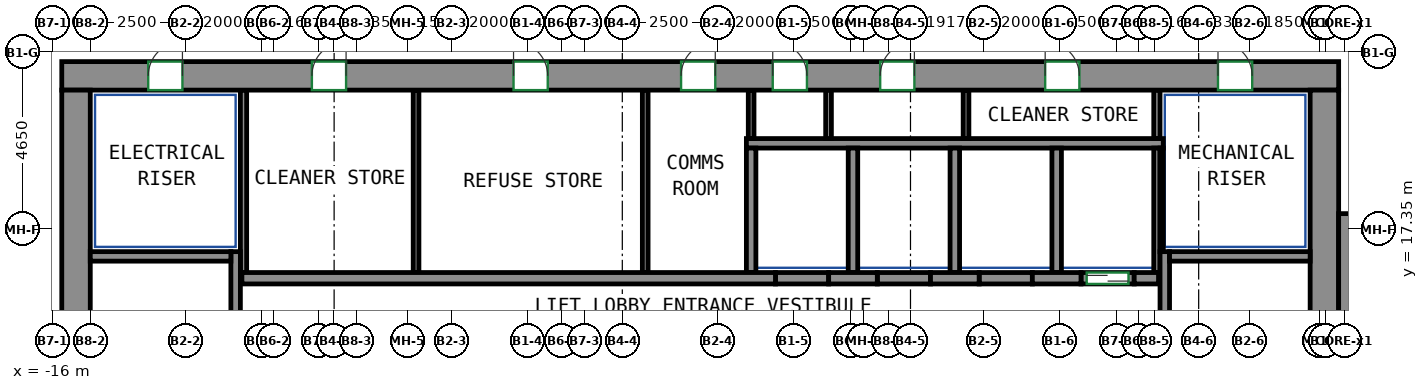
"""IFC4 building model, lengths in metres.
Left out: names, types, materials, properties, quantities, classifications, styles, units other than length and angle.
Written with IfcOpenShell. Run it as: python <this file> out.ifc"""

import sys

from ifc_helpers import new_model, si_unit, direction, frame, frame_2d, origin, place, context, subcontext, project, spatial, rectangle, extrude, source, transform, mapped, element, fill, save


model = new_model("IFC4")
c1 = context("Model", 3, precision=1e-05, world=origin(), true_north=direction((0.0, 1.0)))
c2 = subcontext(c1, "Body", "Model", "MODEL_VIEW")
j1 = project(units=[si_unit("LENGTHUNIT", "METRE"), si_unit("PLANEANGLEUNIT", "RADIAN")], contexts=[c1])
p1 = place(None, origin())
s1 = spatial("IfcSite", under=j1, at=p1, CompositionType="ELEMENT")
p2 = place(p1, origin())
s2 = spatial("IfcBuilding", under=s1, at=p2, CompositionType="ELEMENT")
p3 = place(p2, frame((0.0, 0.0, 182.1)))
s3 = spatial("IfcBuildingStorey", under=s2, at=p3, CompositionType="ELEMENT", Elevation=182.1)
m1 = source(origin(), c2, "Body", "SweptSolid", [
    extrude(rectangle(XDim=33.6, YDim=0.75, at=frame_2d((16.8, 0.0))), origin(), (0.0, 0.0, 1.0), 3.12),
])
p4 = place(p3, frame((-15.75, 21.375, 0.0), z_axis=(0.0, 0.0, 1.0), x_axis=(1.0, 0.0, 0.0)))
e1 = element("IfcWall", 1, at=p4, inside=s3, PredefinedType="SHEAR", context=c2, shape_type="MappedRepresentation", body=[
    mapped(m1, transform((0.0, 0.0, 0.0))),
])
p5 = place(p4, frame((6.581, 0.0, 0.0)))
e2 = element("IfcOpeningElement", 2, at=p5, cuts=e1, PredefinedType="OPENING", context=c2, shape_type="SweptSolid", body=[
    extrude(rectangle(XDim=0.9, YDim=2.1, at=frame_2d((0.45, 1.05))), frame((0.0, 0.385, 0.0), z_axis=(0.0, -1.0, 0.0), x_axis=(1.0, 0.0, 0.0)), (0.0, 0.0, 1.0), 0.77),
])
p6 = place(p4, frame((11.888, 0.0, 0.0)))
e3 = element("IfcOpeningElement", 3, at=p6, cuts=e1, PredefinedType="OPENING", context=c2, shape_type="SweptSolid", body=[
    extrude(rectangle(XDim=0.9, YDim=2.1, at=frame_2d((0.45, 1.05))), frame((0.0, 0.385, 0.0), z_axis=(0.0, -1.0, 0.0), x_axis=(1.0, 0.0, 0.0)), (0.0, 0.0, 1.0), 0.77),
])
p7 = place(p4, frame((16.296, 0.0, 0.0)))
e4 = element("IfcOpeningElement", 4, at=p7, cuts=e1, PredefinedType="OPENING", context=c2, shape_type="SweptSolid", body=[
    extrude(rectangle(XDim=0.9, YDim=2.1, at=frame_2d((0.45, 1.05))), frame((0.0, 0.385, 0.0), z_axis=(0.0, -1.0, 0.0), x_axis=(1.0, 0.0, 0.0)), (0.0, 0.0, 1.0), 0.77),
])
p8 = place(p4, frame((18.708, 0.0, 0.0)))
e5 = element("IfcOpeningElement", 5, at=p8, cuts=e1, PredefinedType="OPENING", context=c2, shape_type="SweptSolid", body=[
    extrude(rectangle(XDim=0.9, YDim=2.1, at=frame_2d((0.45, 1.05))), frame((0.0, 0.385, 0.0), z_axis=(0.0, -1.0, 0.0), x_axis=(1.0, 0.0, 0.0)), (0.0, 0.0, 1.0), 0.77),
])
p9 = place(p4, frame((21.536, 0.0, 0.0)))
e6 = element("IfcOpeningElement", 6, at=p9, cuts=e1, PredefinedType="OPENING", context=c2, shape_type="SweptSolid", body=[
    extrude(rectangle(XDim=0.9, YDim=2.1, at=frame_2d((0.45, 1.05))), frame((0.0, 0.385, 0.0), z_axis=(0.0, -1.0, 0.0), x_axis=(1.0, 0.0, 0.0)), (0.0, 0.0, 1.0), 0.77),
])
p10 = place(p4, frame((25.877, 0.0, 0.0)))
e7 = element("IfcOpeningElement", 7, at=p10, cuts=e1, PredefinedType="OPENING", context=c2, shape_type="SweptSolid", body=[
    extrude(rectangle(XDim=0.9, YDim=2.1, at=frame_2d((0.45, 1.05))), frame((0.0, 0.385, 0.0), z_axis=(0.0, -1.0, 0.0), x_axis=(1.0, 0.0, 0.0)), (0.0, 0.0, 1.0), 0.77),
])
p11 = place(p4, frame((2.275, 0.0, 0.0)))
e8 = element("IfcOpeningElement", 8, at=p11, cuts=e1, PredefinedType="OPENING", context=c2, shape_type="SweptSolid", body=[
    extrude(rectangle(XDim=0.9, YDim=2.1, at=frame_2d((0.45, 1.05))), frame((0.0, 0.385, 0.0), z_axis=(0.0, -1.0, 0.0), x_axis=(1.0, 0.0, 0.0)), (0.0, 0.0, 1.0), 0.77),
])
p12 = place(p4, frame((30.425, 0.0, 0.0)))
e9 = element("IfcOpeningElement", 9, at=p12, cuts=e1, PredefinedType="OPENING", context=c2, shape_type="SweptSolid", body=[
    extrude(rectangle(XDim=0.9, YDim=2.1, at=frame_2d((0.45, 1.05))), frame((0.0, 0.385, 0.0), z_axis=(0.0, -1.0, 0.0), x_axis=(1.0, 0.0, 0.0)), (0.0, 0.0, 1.0), 0.77),
])
m2 = source(origin(), c2, "Body", "SweptSolid", [
    extrude(rectangle(XDim=12.0, YDim=0.75, at=frame_2d((6.0, 0.0))), origin(), (0.0, 0.0, 1.0), 3.12),
])
for number, where, z_axis, x_axis in (
    (10, (-15.375, 9.0, 0.0), (0.0, 0.0, 1.0), (0.0, 1.0, 0.0)),
    (11, (17.475, 9.0, 0.0), (0.0, 0.0, 1.0), (0.0, 1.0, 0.0)),
):
    element("IfcWall", number, at=place(p3, frame(where, z_axis=z_axis, x_axis=x_axis)), inside=s3, PredefinedType="SHEAR", context=c2, shape_type="MappedRepresentation", body=[
        mapped(m2, transform((0.0, 0.0, 0.0))),
    ])
m3 = source(origin(), c2, "Body", "SweptSolid", [
    extrude(rectangle(XDim=7.75, YDim=0.25, at=frame_2d((3.875, 0.0))), origin(), (0.0, 0.0, 1.0), 3.12),
])
p13 = place(p3, frame((-11.175, 9.0, 0.0), z_axis=(0.0, 0.0, 1.0), x_axis=(0.0, 1.0, 0.0)))
e12 = element("IfcWall", 12, at=p13, inside=s3, PredefinedType="SHEAR", context=c2, shape_type="MappedRepresentation", body=[
    mapped(m3, transform((0.0, 0.0, 0.0))),
])
m4 = source(origin(), c2, "Body", "SweptSolid", [
    extrude(rectangle(XDim=3.7, YDim=0.25, at=frame_2d((1.85, 0.0))), origin(), (0.0, 0.0, 1.0), 3.12),
])
p14 = place(p3, frame((-15.0, 16.625, 0.0), z_axis=(0.0, 0.0, 1.0), x_axis=(1.0, 0.0, 0.0)))
e13 = element("IfcWall", 13, at=p14, inside=s3, PredefinedType="SHEAR", context=c2, shape_type="MappedRepresentation", body=[
    mapped(m4, transform((0.0, 0.0, 0.0))),
])
p15 = place(p3, frame((13.275, 9.0, 0.0), z_axis=(0.0, 0.0, 1.0), x_axis=(0.0, 1.0, 0.0)))
e14 = element("IfcWall", 14, at=p15, inside=s3, PredefinedType="SHEAR", context=c2, shape_type="MappedRepresentation", body=[
    mapped(m3, transform((0.0, 0.0, 0.0))),
])
m5 = source(origin(), c2, "Body", "SweptSolid", [
    extrude(rectangle(XDim=3.7, YDim=0.25, at=frame_2d((1.85, 0.0))), origin(), (0.0, 0.0, 1.0), 3.12),
])
p16 = place(p3, frame((13.4, 16.625, 0.0), z_axis=(0.0, 0.0, 1.0), x_axis=(1.0, 0.0, 0.0)))
e15 = element("IfcWall", 15, at=p16, inside=s3, PredefinedType="SHEAR", context=c2, shape_type="MappedRepresentation", body=[
    mapped(m5, transform((0.0, 0.0, 0.0))),
])
m6 = source(origin(), c2, "Body", "SweptSolid", [
    extrude(rectangle(XDim=8.0, YDim=0.5, at=frame_2d((4.0, 0.0))), origin(), (0.0, 0.0, 1.0), 3.12),
])
p17 = place(p3, frame((18.1, 9.75, 0.0), z_axis=(0.0, 0.0, 1.0), x_axis=(0.0, 1.0, 0.0)))
e16 = element("IfcWall", 16, at=p17, inside=s3, PredefinedType="SHEAR", context=c2, shape_type="MappedRepresentation", body=[
    mapped(m6, transform((0.0, 0.0, 0.0))),
])
m7 = source(origin(), c2, "Body", "SweptSolid", [
    extrude(rectangle(XDim=14.04, YDim=0.3, at=frame_2d((7.02, 0.0))), origin(), (0.0, 0.0, 1.0), 3.12),
])
p18 = place(p3, frame((-11.01, 16.05, 0.0), z_axis=(0.0, 0.0, 1.0), x_axis=(1.0, 0.0, 0.0)))
e17 = element("IfcWall", 17, at=p18, inside=s3, PredefinedType="SHEAR", context=c2, shape_type="MappedRepresentation", body=[
    mapped(m7, transform((0.0, 0.0, 0.0))),
])
m8 = source(origin(), c2, "Body", "SweptSolid", [
    extrude(rectangle(XDim=1.28, YDim=0.3, at=frame_2d((0.64, 0.0))), origin(), (0.0, 0.0, 1.0), 3.12),
])
p19 = place(p3, frame((4.43, 16.05, 0.0), z_axis=(0.0, 0.0, 1.0), x_axis=(1.0, 0.0, 0.0)))
e18 = element("IfcWall", 18, at=p19, inside=s3, PredefinedType="SHEAR", context=c2, shape_type="MappedRepresentation", body=[
    mapped(m8, transform((0.0, 0.0, 0.0))),
])
m9 = source(origin(), c2, "Body", "SweptSolid", [
    extrude(rectangle(XDim=1.28, YDim=0.3, at=frame_2d((0.64, 0.0))), origin(), (0.0, 0.0, 1.0), 3.12),
])
p20 = place(p3, frame((7.11, 16.05, 0.0), z_axis=(0.0, 0.0, 1.0), x_axis=(1.0, 0.0, 0.0)))
e19 = element("IfcWall", 19, at=p20, inside=s3, PredefinedType="SHEAR", context=c2, shape_type="MappedRepresentation", body=[
    mapped(m9, transform((0.0, 0.0, 0.0))),
])
p21 = place(p3, frame((9.79, 16.05, 0.0), z_axis=(0.0, 0.0, 1.0), x_axis=(1.0, 0.0, 0.0)))
e20 = element("IfcWall", 20, at=p21, inside=s3, PredefinedType="SHEAR", context=c2, shape_type="MappedRepresentation", body=[
    mapped(m8, transform((0.0, 0.0, 0.0))),
])
m10 = source(origin(), c2, "Body", "SweptSolid", [
    extrude(rectangle(XDim=0.64, YDim=0.3, at=frame_2d((0.32, 0.0))), origin(), (0.0, 0.0, 1.0), 3.12),
])
p22 = place(p3, frame((12.47, 16.05, 0.0), z_axis=(0.0, 0.0, 1.0), x_axis=(1.0, 0.0, 0.0)))
e21 = element("IfcWall", 21, at=p22, inside=s3, PredefinedType="SHEAR", context=c2, shape_type="MappedRepresentation", body=[
    mapped(m10, transform((0.0, 0.0, 0.0))),
])
m11 = source(origin(), c2, "Body", "SweptSolid", [
    extrude(rectangle(XDim=1.4, YDim=0.3, at=frame_2d((0.7, 0.0))), origin(), (0.0, 0.0, 1.0), 3.12),
])
p23 = place(p3, frame((11.07, 16.05, 0.0), z_axis=(0.0, 0.0, 1.0), x_axis=(1.0, 0.0, 0.0)))
e22 = element("IfcWall", 22, at=p23, inside=s3, PredefinedType="PARTITIONING", context=c2, shape_type="MappedRepresentation", body=[
    mapped(m11, transform((0.0, 0.0, 0.0))),
])
p24 = place(p23, frame((0.15, 0.0, 0.0)))
e23 = element("IfcOpeningElement", 23, at=p24, cuts=e22, PredefinedType="OPENING", context=c2, shape_type="SweptSolid", body=[
    extrude(rectangle(XDim=1.1, YDim=2.1, at=frame_2d((0.55, 1.05))), frame((0.0, 0.16, 0.0), z_axis=(0.0, -1.0, 0.0), x_axis=(1.0, 0.0, 0.0)), (0.0, 0.0, 1.0), 0.32),
])
p25 = place(p3, frame((3.03, 16.05, 0.0), z_axis=(0.0, 0.0, 1.0), x_axis=(1.0, 0.0, 0.0)))
e24 = element("IfcWall", 24, at=p25, inside=s3, PredefinedType="PARTITIONING", context=c2, shape_type="MappedRepresentation", body=[
    mapped(m11, transform((0.0, 0.0, 0.0))),
])
m12 = source(origin(), c2, "Body", "SweptSolid", [
    extrude(rectangle(XDim=1.4, YDim=0.3, at=frame_2d((0.7, 0.0))), origin(), (0.0, 0.0, 1.0), 3.12),
])
for number, where, z_axis, x_axis in (
    (25, (5.71, 16.05, 0.0), (0.0, 0.0, 1.0), (1.0, 0.0, 0.0)),
    (26, (8.39, 16.05, 0.0), (0.0, 0.0, 1.0), (1.0, 0.0, 0.0)),
):
    element("IfcWall", number, at=place(p3, frame(where, z_axis=z_axis, x_axis=x_axis)), inside=s3, PredefinedType="PARTITIONING", context=c2, shape_type="MappedRepresentation", body=[
        mapped(m12, transform((0.0, 0.0, 0.0))),
    ])
m13 = source(origin(), c2, "Body", "SweptSolid", [
    extrude(rectangle(XDim=10.97, YDim=0.25, at=frame_2d((5.485, 0.0))), origin(), (0.0, 0.0, 1.0), 3.12),
])
p26 = place(p3, frame((2.265, 19.6, 0.0), z_axis=(0.0, 0.0, 1.0), x_axis=(1.0, 0.0, 0.0)))
e27 = element("IfcWall", 27, at=p26, inside=s3, PredefinedType="PARTITIONING", context=c2, shape_type="MappedRepresentation", body=[
    mapped(m13, transform((0.0, 0.0, 0.0))),
])
m14 = source(origin(), c2, "Body", "SweptSolid", [
    extrude(rectangle(XDim=3.275, YDim=0.165, at=frame_2d((1.638, 0.0))), origin(), (0.0, 0.0, 1.0), 3.12),
])
p27 = place(p3, frame((13.067, 16.2, 0.0), z_axis=(0.0, 0.0, 1.0), x_axis=(0.0, 1.0, 0.0)))
e28 = element("IfcWall", 28, at=p27, inside=s3, PredefinedType="PARTITIONING", context=c2, shape_type="MappedRepresentation", body=[
    mapped(m14, transform((0.0, 0.0, 0.0))),
])
m15 = source(origin(), c2, "Body", "SweptSolid", [
    extrude(rectangle(XDim=1.275, YDim=0.165, at=frame_2d((0.637, 0.0))), origin(), (0.0, 0.0, 1.0), 3.12),
])
p28 = place(p3, frame((13.067, 19.725, 0.0), z_axis=(0.0, 0.0, 1.0), x_axis=(0.0, 1.0, 0.0)))
e29 = element("IfcWall", 29, at=p28, inside=s3, PredefinedType="PARTITIONING", context=c2, shape_type="MappedRepresentation", body=[
    mapped(m15, transform((0.0, 0.0, 0.0))),
])
m16 = source(origin(), c2, "Body", "SweptSolid", [
    extrude(rectangle(XDim=4.8, YDim=0.165, at=frame_2d((2.4, 0.0))), origin(), (0.0, 0.0, 1.0), 3.12),
])
p29 = place(p3, frame((-10.968, 16.2, 0.0), z_axis=(0.0, 0.0, 1.0), x_axis=(0.0, 1.0, 0.0)))
e30 = element("IfcWall", 30, at=p29, inside=s3, PredefinedType="PARTITIONING", context=c2, shape_type="MappedRepresentation", body=[
    mapped(m16, transform((0.0, 0.0, 0.0))),
])
m17 = source(origin(), c2, "Body", "SweptSolid", [
    extrude(rectangle(XDim=3.275, YDim=0.25, at=frame_2d((1.638, 0.0))), origin(), (0.0, 0.0, 1.0), 3.12),
])
p30 = place(p3, frame((10.43, 16.2, 0.0), z_axis=(0.0, 0.0, 1.0), x_axis=(0.0, 1.0, 0.0)))
e31 = element("IfcWall", 31, at=p30, inside=s3, PredefinedType="PARTITIONING", context=c2, shape_type="MappedRepresentation", body=[
    mapped(m17, transform((0.0, 0.0, 0.0))),
])
m18 = source(origin(), c2, "Body", "SweptSolid", [
    extrude(rectangle(XDim=2.725, YDim=0.085, at=frame_2d((1.363, 0.0))), origin(), (0.0, 0.0, 1.0), 3.12),
])
p31 = place(p3, frame((13.192, 16.75, 0.0), z_axis=(0.0, 0.0, 1.0), x_axis=(0.0, 1.0, 0.0)))
e32 = element("IfcWall", 32, at=p31, inside=s3, PredefinedType="PARTITIONING", context=c2, shape_type="MappedRepresentation", body=[
    mapped(m18, transform((0.0, 0.0, 0.0))),
])
for number, where, z_axis, x_axis in (
    (33, (2.39, 16.2, 0.0), (0.0, 0.0, 1.0), (0.0, 1.0, 0.0)),
    (34, (5.07, 16.2, 0.0), (0.0, 0.0, 1.0), (0.0, 1.0, 0.0)),
    (35, (7.75, 16.2, 0.0), (0.0, 0.0, 1.0), (0.0, 1.0, 0.0)),
):
    element("IfcWall", number, at=place(p3, frame(where, z_axis=z_axis, x_axis=x_axis)), inside=s3, PredefinedType="PARTITIONING", context=c2, shape_type="MappedRepresentation", body=[
        mapped(m17, transform((0.0, 0.0, 0.0))),
    ])
m19 = source(origin(), c2, "Body", "SweptSolid", [
    extrude(rectangle(XDim=4.8, YDim=0.15, at=frame_2d((2.4, 0.0))), origin(), (0.0, 0.0, 1.0), 3.12),
])
for number, where, z_axis, x_axis in (
    (36, (-6.427, 16.2, 0.0), (0.0, 0.0, 1.0), (0.0, 1.0, 0.0)),
    (37, (-0.397, 16.2, 0.0), (0.0, 0.0, 1.0), (0.0, 1.0, 0.0)),
):
    element("IfcWall", number, at=place(p3, frame(where, z_axis=z_axis, x_axis=x_axis)), inside=s3, PredefinedType="PARTITIONING", context=c2, shape_type="MappedRepresentation", body=[
        mapped(m19, transform((0.0, 0.0, 0.0))),
    ])
m20 = source(origin(), c2, "Body", "SweptSolid", [
    extrude(rectangle(XDim=1.275, YDim=0.15, at=frame_2d((0.637, 0.0))), origin(), (0.0, 0.0, 1.0), 3.12),
])
for number, where, z_axis, x_axis in (
    (38, (2.39, 19.725, 0.0), (0.0, 0.0, 1.0), (0.0, 1.0, 0.0)),
    (39, (4.427, 19.725, 0.0), (0.0, 0.0, 1.0), (0.0, 1.0, 0.0)),
    (40, (8.045, 19.725, 0.0), (0.0, 0.0, 1.0), (0.0, 1.0, 0.0)),
):
    element("IfcWall", number, at=place(p3, frame(where, z_axis=z_axis, x_axis=x_axis)), inside=s3, PredefinedType="PARTITIONING", context=c2, shape_type="MappedRepresentation", body=[
        mapped(m20, transform((0.0, 0.0, 0.0))),
    ])
p32 = place(p24, origin())
e41 = element("IfcDoor", 41, at=p32, inside=s3, OperationType="DOUBLE_DOOR_SLIDING", PredefinedType="DOOR", context=c2, shape_type="SweptSolid", body=[
    extrude(rectangle(XDim=1.1, YDim=2.1, at=frame_2d((0.55, 1.05))), frame((0.0, 0.025, 0.0), z_axis=(0.0, -1.0, 0.0), x_axis=(1.0, 0.0, 0.0)), (0.0, 0.0, 1.0), 0.05),
])
fill(e23, e41)
p33 = place(p5, origin())
e42 = element("IfcDoor", 42, at=p33, inside=s3, OperationType="SINGLE_SWING_RIGHT", PredefinedType="DOOR", context=c2, shape_type="SweptSolid", body=[
    extrude(rectangle(XDim=0.9, YDim=2.1, at=frame_2d((0.45, 1.05))), frame((0.0, -0.23, 0.0), z_axis=(0.0, -1.0, 0.0), x_axis=(1.0, 0.0, 0.0)), (0.0, 0.0, 1.0), 0.05),
])
fill(e2, e42)
p34 = place(p6, origin())
e43 = element("IfcDoor", 43, at=p34, inside=s3, OperationType="SINGLE_SWING_LEFT", PredefinedType="DOOR", context=c2, shape_type="SweptSolid", body=[
    extrude(rectangle(XDim=0.9, YDim=2.1, at=frame_2d((0.45, 1.05))), frame((0.0, -0.23, 0.0), z_axis=(0.0, -1.0, 0.0), x_axis=(1.0, 0.0, 0.0)), (0.0, 0.0, 1.0), 0.05),
])
fill(e3, e43)
p35 = place(p7, origin())
e44 = element("IfcDoor", 44, at=p35, inside=s3, OperationType="SINGLE_SWING_RIGHT", PredefinedType="DOOR", context=c2, shape_type="SweptSolid", body=[
    extrude(rectangle(XDim=0.9, YDim=2.1, at=frame_2d((0.45, 1.05))), frame((0.0, -0.23, 0.0), z_axis=(0.0, -1.0, 0.0), x_axis=(1.0, 0.0, 0.0)), (0.0, 0.0, 1.0), 0.05),
])
fill(e4, e44)
p36 = place(p8, origin())
e45 = element("IfcDoor", 45, at=p36, inside=s3, OperationType="SINGLE_SWING_LEFT", PredefinedType="DOOR", context=c2, shape_type="SweptSolid", body=[
    extrude(rectangle(XDim=0.9, YDim=2.1, at=frame_2d((0.45, 1.05))), frame((0.0, -0.23, 0.0), z_axis=(0.0, -1.0, 0.0), x_axis=(1.0, 0.0, 0.0)), (0.0, 0.0, 1.0), 0.05),
])
fill(e5, e45)
p37 = place(p9, origin())
e46 = element("IfcDoor", 46, at=p37, inside=s3, OperationType="SINGLE_SWING_RIGHT", PredefinedType="DOOR", context=c2, shape_type="SweptSolid", body=[
    extrude(rectangle(XDim=0.9, YDim=2.1, at=frame_2d((0.45, 1.05))), frame((0.0, -0.23, 0.0), z_axis=(0.0, -1.0, 0.0), x_axis=(1.0, 0.0, 0.0)), (0.0, 0.0, 1.0), 0.05),
])
fill(e6, e46)
p38 = place(p10, origin())
e47 = element("IfcDoor", 47, at=p38, inside=s3, OperationType="SINGLE_SWING_LEFT", PredefinedType="DOOR", context=c2, shape_type="SweptSolid", body=[
    extrude(rectangle(XDim=0.9, YDim=2.1, at=frame_2d((0.45, 1.05))), frame((0.0, -0.23, 0.0), z_axis=(0.0, -1.0, 0.0), x_axis=(1.0, 0.0, 0.0)), (0.0, 0.0, 1.0), 0.05),
])
fill(e7, e47)
p39 = place(p11, origin())
e48 = element("IfcDoor", 48, at=p39, inside=s3, OperationType="SINGLE_SWING_RIGHT", PredefinedType="DOOR", context=c2, shape_type="SweptSolid", body=[
    extrude(rectangle(XDim=0.9, YDim=2.1, at=frame_2d((0.45, 1.05))), frame((0.0, -0.23, 0.0), z_axis=(0.0, -1.0, 0.0), x_axis=(1.0, 0.0, 0.0)), (0.0, 0.0, 1.0), 0.05),
])
fill(e8, e48)
p40 = place(p12, origin())
e49 = element("IfcDoor", 49, at=p40, inside=s3, OperationType="SINGLE_SWING_LEFT", PredefinedType="DOOR", context=c2, shape_type="SweptSolid", body=[
    extrude(rectangle(XDim=0.9, YDim=2.1, at=frame_2d((0.45, 1.05))), frame((0.0, -0.23, 0.0), z_axis=(0.0, -1.0, 0.0), x_axis=(1.0, 0.0, 0.0)), (0.0, 0.0, 1.0), 0.05),
])
fill(e9, e49)
save(model, sys.argv[1])
